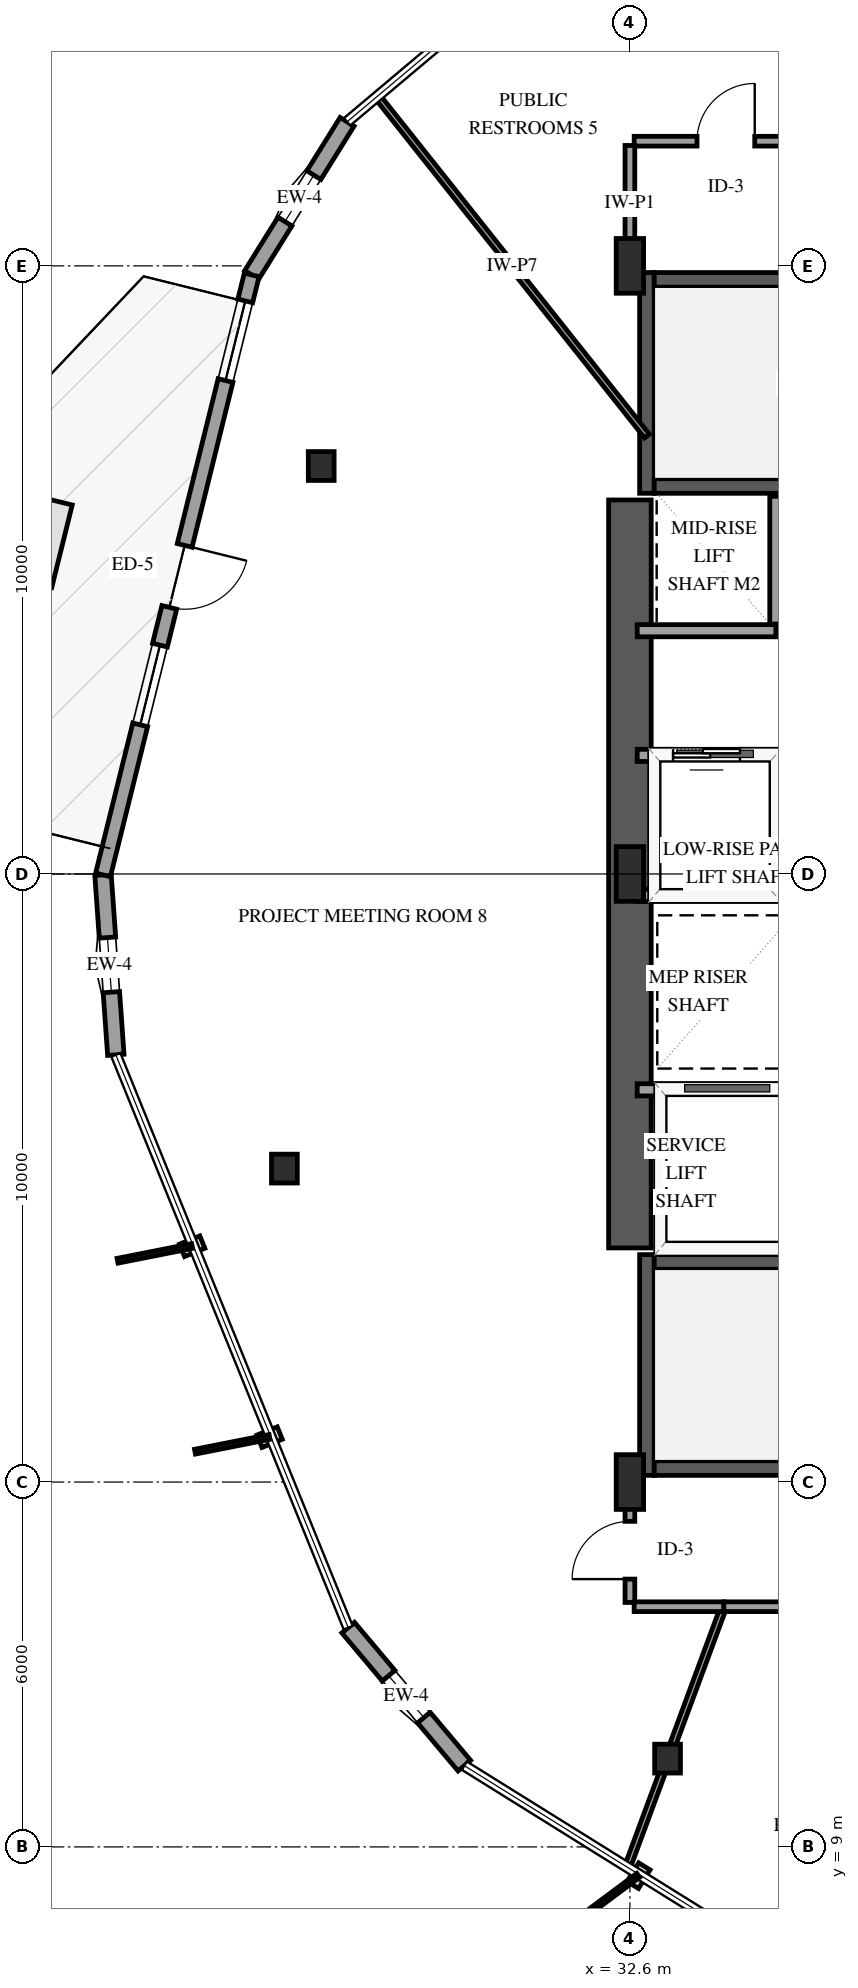
"""IFC4 building model, lengths in metres.
Left out: names, types, materials, properties, quantities, classifications, styles, units other than length and angle.
Written with IfcOpenShell. Run it as: python <this file> out.ifc"""

import sys

from ifc_helpers import new_model, si_unit, direction, frame, frame_2d, origin, origin_2d, place, context, subcontext, project, spatial, rectangle, i_section, extrude, element, fill, save


model = new_model("IFC4")
c1 = context("Model", 3, precision=1e-05, world=origin(), true_north=direction((0.0, 1.0)))
c2 = subcontext(c1, "Body", "Model", "MODEL_VIEW")
j1 = project(units=[si_unit("LENGTHUNIT", "METRE"), si_unit("PLANEANGLEUNIT", "RADIAN")], contexts=[c1])
p1 = place(None, origin())
s1 = spatial("IfcSite", under=j1, at=p1, CompositionType="ELEMENT")
p2 = place(p1, origin())
s2 = spatial("IfcBuilding", under=s1, at=p2, CompositionType="ELEMENT")
p3 = place(p2, frame((0.0, 0.0, 42.6)))
s3 = spatial("IfcBuildingStorey", under=s2, at=p3, CompositionType="ELEMENT", Elevation=42.6)
p4 = place(p3, frame((32.88, 15.11, 0.0), z_axis=(0.0, 0.0, 1.0), x_axis=(0.0, 1.0, 0.0)))
e1 = element("IfcWall", 1, at=p4, inside=s3, PredefinedType="SHEAR", context=c2, shape_type="SweptSolid", body=[
    extrude(rectangle(XDim=3.63, YDim=0.24, at=frame_2d((1.815, 0.0))), origin(), (0.0, 0.0, 1.0), 4.0),
])
for number, where, z_axis, x_axis in (
    (2, (33.0, 15.23, 0.0), (0.0, 0.0, 1.0), (1.0, 0.0, 0.0)),
    (3, (33.0, 18.62, 0.0), (0.0, 0.0, 1.0), (1.0, 0.0, 0.0)),
):
    element("IfcWall", number, at=place(p3, frame(where, z_axis=z_axis, x_axis=x_axis)), inside=s3, PredefinedType="SHEAR", context=c2, shape_type="SweptSolid", body=[
        extrude(rectangle(XDim=8.0, YDim=0.24, at=frame_2d((4.0, 0.0))), origin(), (0.0, 0.0, 1.0), 4.0),
    ])
p5 = place(p3, frame((32.88, 31.26, 0.0), z_axis=(0.0, 0.0, 1.0), x_axis=(0.0, 1.0, 0.0)))
e4 = element("IfcWall", 4, at=p5, inside=s3, PredefinedType="SHEAR", context=c2, shape_type="SweptSolid", body=[
    extrude(rectangle(XDim=3.63, YDim=0.24, at=frame_2d((1.815, 0.0))), origin(), (0.0, 0.0, 1.0), 4.0),
])
for number, where, z_axis, x_axis in (
    (5, (33.0, 31.38, 0.0), (0.0, 0.0, 1.0), (1.0, 0.0, 0.0)),
    (6, (33.0, 34.77, 0.0), (0.0, 0.0, 1.0), (1.0, 0.0, 0.0)),
):
    element("IfcWall", number, at=place(p3, frame(where, z_axis=z_axis, x_axis=x_axis)), inside=s3, PredefinedType="SHEAR", context=c2, shape_type="SweptSolid", body=[
        extrude(rectangle(XDim=8.0, YDim=0.24, at=frame_2d((4.0, 0.0))), origin(), (0.0, 0.0, 1.0), 4.0),
    ])
p6 = place(p3, frame((32.6, 18.85, 0.0), z_axis=(0.0, 0.0, 1.0), x_axis=(0.0, 1.0, 0.0)))
e7 = element("IfcWall", 7, at=p6, inside=s3, PredefinedType="SHEAR", context=c2, shape_type="SweptSolid", body=[
    extrude(rectangle(XDim=12.3, YDim=0.7, at=frame_2d((6.15, 0.0))), origin(), (0.0, 0.0, 1.0), 4.0),
])
for number, where, z_axis, x_axis in (
    (8, (32.6, 15.0, 0.0), (0.0, 0.0, 1.0), (1.0, 0.0, 0.0)),
    (9, (32.6, 25.0, 0.0), (0.0, 0.0, 1.0), (1.0, 0.0, 0.0)),
    (10, (32.6, 35.0, 0.0), (0.0, 0.0, 1.0), (1.0, 0.0, 0.0)),
):
    element("IfcColumn", number, at=place(p3, frame(where, z_axis=z_axis, x_axis=x_axis)), inside=s3, PredefinedType="PILASTER", context=c2, shape_type="SweptSolid", body=[
        extrude(rectangle(XDim=0.45, YDim=0.9, at=origin_2d()), origin(), (0.0, 0.0, 1.0), 4.0),
    ])
for number, where, z_axis, x_axis in (
    (11, (27.523, 31.708, 0.0), (0.0, 0.0, 1.0), (1.0, 0.0, 0.0)),
    (12, (26.918, 20.155, 0.0), (0.0, 0.0, 1.0), (1.0, 0.0, 0.0)),
    (13, (33.219, 10.452, 0.0), (0.0, 0.0, 1.0), (1.0, 0.0, 0.0)),
):
    element("IfcColumn", number, at=place(p3, frame(where, z_axis=z_axis, x_axis=x_axis)), inside=s3, PredefinedType="COLUMN", context=c2, shape_type="SweptSolid", body=[
        extrude(i_section(OverallWidth=0.424, OverallDepth=0.474, WebThickness=0.048, FlangeThickness=0.077, FilletRadius=0.038, at=origin_2d()), origin(), (0.0, 0.0, 1.0), 4.0),
    ])
p7 = place(p3, frame((27.949, 37.369, 0.0), z_axis=(0.0, 0.0, 1.0), x_axis=(-0.528777761123, -0.848760319137, 0.0)))
e14 = element("IfcWall", 14, at=p7, inside=s3, PredefinedType="SOLIDWALL", context=c2, shape_type="SweptSolid", body=[
    extrude(rectangle(XDim=2.967, YDim=0.27, at=frame_2d((1.483, 0.0))), origin(), (0.0, 0.0, 1.0), 3.079),
])
p8 = place(p7, frame((1.033, 0.0, 0.75)))
e15 = element("IfcOpeningElement", 15, at=p8, cuts=e14, PredefinedType="OPENING", context=c2, shape_type="SweptSolid", body=[
    extrude(rectangle(XDim=0.9, YDim=1.5, at=frame_2d((0.45, 0.75))), frame((0.0, 0.145, 0.0), z_axis=(0.0, -1.0, 0.0), x_axis=(1.0, 0.0, 0.0)), (0.0, 0.0, 1.0), 0.29),
])
p9 = place(p3, frame((23.935, 24.985, 0.0), z_axis=(0.0, 0.0, 1.0), x_axis=(0.071100844018, -0.997469132344, 0.0)))
e16 = element("IfcWall", 16, at=p9, inside=s3, PredefinedType="SOLIDWALL", context=c2, shape_type="SweptSolid", body=[
    extrude(rectangle(XDim=2.967, YDim=0.27, at=frame_2d((1.483, 0.0))), origin(), (0.0, 0.0, 1.0), 3.079),
])
p10 = place(p9, frame((1.033, 0.0, 0.75)))
e17 = element("IfcOpeningElement", 17, at=p10, cuts=e16, PredefinedType="OPENING", context=c2, shape_type="SweptSolid", body=[
    extrude(rectangle(XDim=0.9, YDim=1.5, at=frame_2d((0.45, 0.75))), frame((0.0, 0.145, 0.0), z_axis=(0.0, -1.0, 0.0), x_axis=(1.0, 0.0, 0.0)), (0.0, 0.0, 1.0), 0.29),
])
p11 = place(p3, frame((26.38, 34.851, 0.0), z_axis=(0.0, 0.0, 1.0), x_axis=(-0.2405572261, -0.970634957629, 0.0)))
e18 = element("IfcWall", 18, at=p11, inside=s3, PredefinedType="SOLIDWALL", context=c2, shape_type="SweptSolid", body=[
    extrude(rectangle(XDim=10.165, YDim=0.25, at=frame_2d((5.083, 0.0))), origin(), (0.0, 0.0, 1.0), 3.079),
])
p12 = place(p11, frame((4.583, 0.0, 0.0)))
e19 = element("IfcOpeningElement", 19, at=p12, cuts=e18, PredefinedType="OPENING", context=c2, shape_type="SweptSolid", body=[
    extrude(rectangle(XDim=1.05, YDim=2.15, at=frame_2d((0.525, 1.075))), frame((0.0, 0.135, 0.0), z_axis=(0.0, -1.0, 0.0), x_axis=(1.0, 0.0, 0.0)), (0.0, 0.0, 1.0), 0.27),
])
p13 = place(p11, frame((0.44, 0.0, 0.72)))
e20 = element("IfcOpeningElement", 20, at=p13, cuts=e18, PredefinedType="OPENING", context=c2, shape_type="SweptSolid", body=[
    extrude(rectangle(XDim=1.35, YDim=1.65, at=frame_2d((0.675, 0.825))), frame((0.0, 0.135, 0.0), z_axis=(0.0, -1.0, 0.0), x_axis=(1.0, 0.0, 0.0)), (0.0, 0.0, 1.0), 0.27),
])
p14 = place(p11, frame((6.273, 0.0, 0.72)))
e21 = element("IfcOpeningElement", 21, at=p14, cuts=e18, PredefinedType="OPENING", context=c2, shape_type="SweptSolid", body=[
    extrude(rectangle(XDim=1.35, YDim=1.65, at=frame_2d((0.675, 0.825))), frame((0.0, 0.135, 0.0), z_axis=(0.0, -1.0, 0.0), x_axis=(1.0, 0.0, 0.0)), (0.0, 0.0, 1.0), 0.27),
])
p15 = place(p3, frame((27.967, 12.606, 0.0), z_axis=(0.0, 0.0, 1.0), x_axis=(0.643844242511, -0.765156579653, 0.0)))
e22 = element("IfcWall", 22, at=p15, inside=s3, PredefinedType="SOLIDWALL", context=c2, shape_type="SweptSolid", body=[
    extrude(rectangle(XDim=2.966, YDim=0.27, at=frame_2d((1.483, 0.0))), origin(), (0.0, 0.0, 1.0), 3.079),
])
p16 = place(p15, frame((1.033, 0.0, 0.75)))
e23 = element("IfcOpeningElement", 23, at=p16, cuts=e22, PredefinedType="OPENING", context=c2, shape_type="SweptSolid", body=[
    extrude(rectangle(XDim=0.9, YDim=1.5, at=frame_2d((0.45, 0.75))), frame((0.0, 0.145, 0.0), z_axis=(0.0, -1.0, 0.0), x_axis=(1.0, 0.0, 0.0)), (0.0, 0.0, 1.0), 0.29),
])
p17 = place(p3, frame((32.72, 21.45, 0.0), z_axis=(0.0, 0.0, 1.0), x_axis=(1.0, 0.0, 0.0)))
e24 = element("IfcWall", 24, at=p17, inside=s3, PredefinedType="SOLIDWALL", context=c2, shape_type="SweptSolid", body=[
    extrude(rectangle(XDim=2.58, YDim=0.2, at=frame_2d((1.29, 0.0))), origin(), (0.0, 0.0, 1.0), 3.7),
])
p18 = place(p3, frame((32.72, 24.65, 0.0), z_axis=(0.0, 0.0, 1.0), x_axis=(1.0, 0.0, 0.0)))
e25 = element("IfcWall", 25, at=p18, inside=s3, PredefinedType="SOLIDWALL", context=c2, shape_type="SweptSolid", body=[
    extrude(rectangle(XDim=2.28, YDim=0.2, at=frame_2d((1.14, 0.0))), origin(), (0.0, 0.0, 1.0), 3.7),
])
p19 = place(p3, frame((32.72, 26.95, 0.0), z_axis=(0.0, 0.0, 1.0), x_axis=(1.0, 0.0, 0.0)))
e26 = element("IfcWall", 26, at=p19, inside=s3, PredefinedType="SOLIDWALL", context=c2, shape_type="SweptSolid", body=[
    extrude(rectangle(XDim=2.28, YDim=0.2, at=frame_2d((1.14, 0.0))), origin(), (0.0, 0.0, 1.0), 3.7),
])
p20 = place(p19, frame((0.59, 0.0, 0.0)))
e27 = element("IfcOpeningElement", 27, at=p20, cuts=e26, PredefinedType="OPENING", context=c2, shape_type="SweptSolid", body=[
    extrude(rectangle(XDim=1.1, YDim=2.15, at=frame_2d((0.55, 1.075))), frame((0.0, 0.11, 0.0), z_axis=(0.0, -1.0, 0.0), x_axis=(1.0, 0.0, 0.0)), (0.0, 0.0, 1.0), 0.22),
])
p21 = place(p3, frame((35.0, 24.76, 0.0), z_axis=(0.0, 0.0, 1.0), x_axis=(0.0, 1.0, 0.0)))
e28 = element("IfcWall", 28, at=p21, inside=s3, PredefinedType="SOLIDWALL", context=c2, shape_type="SweptSolid", body=[
    extrude(rectangle(XDim=2.08, YDim=0.2, at=frame_2d((1.04, 0.0))), origin(), (0.0, 0.0, 1.0), 3.7),
])
p22 = place(p3, frame((32.72, 29.0, 0.0), z_axis=(0.0, 0.0, 1.0), x_axis=(1.0, 0.0, 0.0)))
e29 = element("IfcWall", 29, at=p22, inside=s3, PredefinedType="SOLIDWALL", context=c2, shape_type="SweptSolid", body=[
    extrude(rectangle(XDim=2.28, YDim=0.2, at=frame_2d((1.14, 0.0))), origin(), (0.0, 0.0, 1.0), 3.7),
])
p23 = place(p3, frame((35.0, 29.11, 0.0), z_axis=(0.0, 0.0, 1.0), x_axis=(0.0, 1.0, 0.0)))
e30 = element("IfcWall", 30, at=p23, inside=s3, PredefinedType="SOLIDWALL", context=c2, shape_type="SweptSolid", body=[
    extrude(rectangle(XDim=2.1, YDim=0.2, at=frame_2d((1.05, 0.0))), origin(), (0.0, 0.0, 1.0), 3.7),
])
p24 = place(p3, frame((32.88, 32.202, 0.0), z_axis=(0.0, 0.0, 1.0), x_axis=(-0.621839537778, 0.783144679645, 0.0)))
e31 = element("IfcWall", 31, at=p24, inside=s3, PredefinedType="PARTITIONING", context=c2, shape_type="SweptSolid", body=[
    extrude(rectangle(XDim=7.132, YDim=0.1, at=frame_2d((3.566, 0.0))), origin(), (0.0, 0.0, 1.0), 3.7),
])
p25 = place(p3, frame((35.687, 37.05, 0.0), z_axis=(0.0, 0.0, 1.0), x_axis=(-0.234963384599, 0.97200422216, 0.0)))
e32 = element("IfcWall", 32, at=p25, inside=s3, PredefinedType="PARTITIONING", context=c2, shape_type="SweptSolid", body=[
    extrude(rectangle(XDim=5.84, YDim=0.13, at=frame_2d((2.92, 0.0))), origin(), (0.0, 0.0, 1.0), 2.995),
])
p26 = place(p3, frame((34.143, 12.95, 0.0), z_axis=(0.0, 0.0, 1.0), x_axis=(-0.346990546702, -0.937868626461, 0.0)))
e33 = element("IfcWall", 33, at=p26, inside=s3, PredefinedType="PARTITIONING", context=c2, shape_type="SweptSolid", body=[
    extrude(rectangle(XDim=4.568, YDim=0.1, at=frame_2d((2.284, 0.0))), origin(), (0.0, 0.0, 1.0), 2.995),
])
p27 = place(p3, frame((38.479, 12.95, 0.0), z_axis=(0.0, 0.0, 1.0), x_axis=(-1.0, 0.0, 0.0)))
e34 = element("IfcWall", 34, at=p27, inside=s3, PredefinedType="PARTITIONING", context=c2, shape_type="SweptSolid", body=[
    extrude(rectangle(XDim=4.336, YDim=0.16, at=frame_2d((2.168, 0.0))), origin(), (0.0, 0.0, 1.0), 3.7),
])
p28 = place(p27, frame((1.693, 0.0, 0.0)))
e35 = element("IfcOpeningElement", 35, at=p28, cuts=e34, PredefinedType="OPENING", context=c2, shape_type="SweptSolid", body=[
    extrude(rectangle(XDim=0.95, YDim=2.15, at=frame_2d((0.475, 1.075))), frame((0.0, 0.09, 0.0), z_axis=(0.0, -1.0, 0.0), x_axis=(1.0, 0.0, 0.0)), (0.0, 0.0, 1.0), 0.18),
])
p29 = place(p3, frame((32.67, 37.05, 0.0), z_axis=(0.0, 0.0, 1.0), x_axis=(1.0, 0.0, 0.0)))
e36 = element("IfcWall", 36, at=p29, inside=s3, PredefinedType="PARTITIONING", context=c2, shape_type="SweptSolid", body=[
    extrude(rectangle(XDim=3.017, YDim=0.16, at=frame_2d((1.509, 0.0))), origin(), (0.0, 0.0, 1.0), 3.7),
])
p30 = place(p29, frame((1.033, 0.0, 0.0)))
e37 = element("IfcOpeningElement", 37, at=p30, cuts=e36, PredefinedType="OPENING", context=c2, shape_type="SweptSolid", body=[
    extrude(rectangle(XDim=0.95, YDim=2.15, at=frame_2d((0.475, 1.075))), frame((0.0, 0.09, 0.0), z_axis=(0.0, -1.0, 0.0), x_axis=(1.0, 0.0, 0.0)), (0.0, 0.0, 1.0), 0.18),
])
p31 = place(p3, frame((32.6, 13.02, 0.0), z_axis=(0.0, 0.0, 1.0), x_axis=(0.0, 1.0, 0.0)))
e38 = element("IfcWall", 38, at=p31, inside=s3, PredefinedType="PARTITIONING", context=c2, shape_type="SweptSolid", body=[
    extrude(rectangle(XDim=1.91, YDim=0.16, at=frame_2d((0.955, 0.0))), origin(), (0.0, 0.0, 1.0), 3.7),
])
p32 = place(p31, frame((0.384, 0.0, 0.0)))
e39 = element("IfcOpeningElement", 39, at=p32, cuts=e38, PredefinedType="OPENING", context=c2, shape_type="SweptSolid", body=[
    extrude(rectangle(XDim=0.95, YDim=2.15, at=frame_2d((0.475, 1.075))), frame((0.0, 0.09, 0.0), z_axis=(0.0, -1.0, 0.0), x_axis=(1.0, 0.0, 0.0)), (0.0, 0.0, 1.0), 0.18),
])
p33 = place(p3, frame((32.6, 35.07, 0.0), z_axis=(0.0, 0.0, 1.0), x_axis=(0.0, 1.0, 0.0)))
e40 = element("IfcWall", 40, at=p33, inside=s3, PredefinedType="PARTITIONING", context=c2, shape_type="SweptSolid", body=[
    extrude(rectangle(XDim=1.91, YDim=0.16, at=frame_2d((0.955, 0.0))), origin(), (0.0, 0.0, 1.0), 3.7),
])
p34 = place(p3, frame((34.143, 12.95, 0.0), z_axis=(0.0, 0.0, 1.0), x_axis=(-1.0, 0.0, 0.0)))
e41 = element("IfcWall", 41, at=p34, inside=s3, PredefinedType="PARTITIONING", context=c2, shape_type="SweptSolid", body=[
    extrude(rectangle(XDim=1.473, YDim=0.16, at=frame_2d((0.737, 0.0))), origin(), (0.0, 0.0, 1.0), 3.7),
])
p35 = place(p8, origin())
e42 = element("IfcWindow", 42, at=p35, inside=s3, PartitioningType="SINGLE_PANEL", PredefinedType="WINDOW", context=c2, shape_type="SweptSolid", body=[
    extrude(rectangle(XDim=0.9, YDim=1.5, at=frame_2d((0.45, 0.75))), frame((0.0, 0.03, 0.0), z_axis=(0.0, -1.0, 0.0), x_axis=(1.0, 0.0, 0.0)), (0.0, 0.0, 1.0), 0.06),
])
fill(e15, e42)
p36 = place(p10, origin())
e43 = element("IfcWindow", 43, at=p36, inside=s3, PartitioningType="SINGLE_PANEL", PredefinedType="WINDOW", context=c2, shape_type="SweptSolid", body=[
    extrude(rectangle(XDim=0.9, YDim=1.5, at=frame_2d((0.45, 0.75))), frame((0.0, 0.03, 0.0), z_axis=(0.0, -1.0, 0.0), x_axis=(1.0, 0.0, 0.0)), (0.0, 0.0, 1.0), 0.06),
])
fill(e17, e43)
p37 = place(p12, origin())
e44 = element("IfcDoor", 44, at=p37, inside=s3, OperationType="SINGLE_SWING_LEFT", PredefinedType="DOOR", context=c2, shape_type="SweptSolid", body=[
    extrude(rectangle(XDim=1.05, YDim=2.15, at=frame_2d((0.525, 1.075))), frame((0.0, 0.025, 0.0), z_axis=(0.0, -1.0, 0.0), x_axis=(1.0, 0.0, 0.0)), (0.0, 0.0, 1.0), 0.05),
])
fill(e19, e44)
p38 = place(p13, origin())
e45 = element("IfcWindow", 45, at=p38, inside=s3, PartitioningType="SINGLE_PANEL", PredefinedType="WINDOW", context=c2, shape_type="SweptSolid", body=[
    extrude(rectangle(XDim=1.35, YDim=1.65, at=frame_2d((0.675, 0.825))), frame((0.0, 0.03, 0.0), z_axis=(0.0, -1.0, 0.0), x_axis=(1.0, 0.0, 0.0)), (0.0, 0.0, 1.0), 0.06),
])
fill(e20, e45)
p39 = place(p14, origin())
e46 = element("IfcWindow", 46, at=p39, inside=s3, PartitioningType="SINGLE_PANEL", PredefinedType="WINDOW", context=c2, shape_type="SweptSolid", body=[
    extrude(rectangle(XDim=1.35, YDim=1.65, at=frame_2d((0.675, 0.825))), frame((0.0, 0.03, 0.0), z_axis=(0.0, -1.0, 0.0), x_axis=(1.0, 0.0, 0.0)), (0.0, 0.0, 1.0), 0.06),
])
fill(e21, e46)
p40 = place(p16, origin())
e47 = element("IfcWindow", 47, at=p40, inside=s3, PartitioningType="SINGLE_PANEL", PredefinedType="WINDOW", context=c2, shape_type="SweptSolid", body=[
    extrude(rectangle(XDim=0.9, YDim=1.5, at=frame_2d((0.45, 0.75))), frame((0.0, 0.03, 0.0), z_axis=(0.0, -1.0, 0.0), x_axis=(1.0, 0.0, 0.0)), (0.0, 0.0, 1.0), 0.06),
])
fill(e23, e47)
p41 = place(p20, origin())
e48 = element("IfcDoor", 48, at=p41, inside=s3, OperationType="SLIDING_TO_LEFT", PredefinedType="DOOR", context=c2, shape_type="SweptSolid", body=[
    extrude(rectangle(XDim=1.1, YDim=2.15, at=frame_2d((0.55, 1.075))), frame((0.0, 0.025, 0.0), z_axis=(0.0, -1.0, 0.0), x_axis=(1.0, 0.0, 0.0)), (0.0, 0.0, 1.0), 0.05),
])
fill(e27, e48)
p42 = place(p30, origin())
e49 = element("IfcDoor", 49, at=p42, inside=s3, OperationType="SINGLE_SWING_RIGHT", PredefinedType="DOOR", context=c2, shape_type="SweptSolid", body=[
    extrude(rectangle(XDim=0.95, YDim=2.15, at=frame_2d((0.475, 1.075))), frame((0.0, 0.025, 0.0), z_axis=(0.0, -1.0, 0.0), x_axis=(1.0, 0.0, 0.0)), (0.0, 0.0, 1.0), 0.05),
])
fill(e37, e49)
p43 = place(p32, origin())
e50 = element("IfcDoor", 50, at=p43, inside=s3, OperationType="SINGLE_SWING_LEFT", PredefinedType="DOOR", context=c2, shape_type="SweptSolid", body=[
    extrude(rectangle(XDim=0.95, YDim=2.15, at=frame_2d((0.475, 1.075))), frame((0.0, 0.025, 0.0), z_axis=(0.0, -1.0, 0.0), x_axis=(1.0, 0.0, 0.0)), (0.0, 0.0, 1.0), 0.05),
])
fill(e39, e50)
save(model, sys.argv[1])
